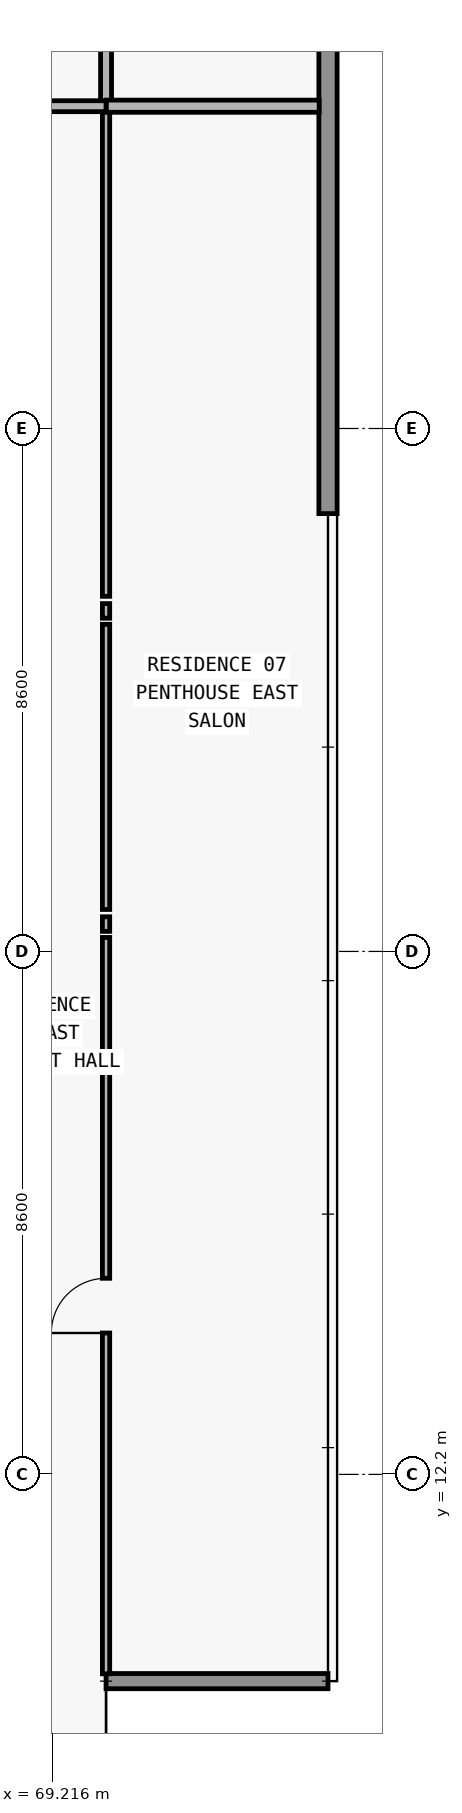
"""IFC4 building model, lengths in metres.
Left out: names, types, materials, properties, quantities, classifications, styles, units other than length and angle.
Written with IfcOpenShell. Run it as: python <this file> out.ifc"""

import sys

from ifc_helpers import new_model, si_unit, direction, frame, frame_2d, origin, place, context, subcontext, project, spatial, rectangle, extrude, element, fill, save


model = new_model("IFC4")
c1 = context("Model", 3, precision=1e-05, world=origin(), true_north=direction((0.0, 1.0)))
c2 = subcontext(c1, "Body", "Model", "MODEL_VIEW")
j1 = project(units=[si_unit("LENGTHUNIT", "METRE"), si_unit("PLANEANGLEUNIT", "RADIAN")], contexts=[c1])
p1 = place(None, origin())
s1 = spatial("IfcSite", under=j1, at=p1, CompositionType="ELEMENT")
p2 = place(p1, origin())
s2 = spatial("IfcBuilding", under=s1, at=p2, CompositionType="ELEMENT")
p3 = place(p2, frame((0.0, 0.0, 122.4)))
s3 = spatial("IfcBuildingStorey", under=s2, at=p3, CompositionType="ELEMENT", Elevation=122.4)
p4 = place(p3, frame((70.1, 8.8, 0.0), z_axis=(0.0, 0.0, 1.0), x_axis=(1.0, 0.0, 0.0)))
e1 = element("IfcWall", 1, at=p4, inside=s3, PredefinedType="ELEMENTEDWALL", context=c2, shape_type="SweptSolid", body=[
    extrude(rectangle(XDim=3.65, YDim=0.25, at=frame_2d((1.825, 0.0))), origin(), (0.0, 0.0, 1.0), 3.05),
])
p5 = place(p3, frame((73.75, 47.2, 0.0), z_axis=(0.0, 0.0, 1.0), x_axis=(0.0, -1.0, 0.0)))
e2 = element("IfcWall", 2, at=p5, inside=s3, PredefinedType="STANDARD", context=c2, shape_type="SweptSolid", body=[
    extrude(rectangle(XDim=19.2, YDim=0.3, at=frame_2d((9.6, 0.0))), origin(), (0.0, 0.0, 1.0), 3.05),
])
p6 = place(p3, frame((70.1, 8.92, 0.0), z_axis=(0.0, 0.0, 1.0), x_axis=(0.0, 1.0, 0.0)))
e3 = element("IfcWall", 3, at=p6, inside=s3, PredefinedType="PARTITIONING", context=c2, shape_type="SweptSolid", body=[
    extrude(rectangle(XDim=12.11, YDim=0.12, at=frame_2d((6.055, 0.0))), origin(), (0.0, 0.0, 1.0), 3.05),
])
p7 = place(p6, frame((5.605, 0.0, 0.0)))
e4 = element("IfcOpeningElement", 4, at=p7, cuts=e3, PredefinedType="OPENING", context=c2, shape_type="SweptSolid", body=[
    extrude(rectangle(XDim=0.9, YDim=2.15, at=frame_2d((0.45, 1.075))), frame((0.0, 0.07, 0.0), z_axis=(0.0, -1.0, 0.0), x_axis=(1.0, 0.0, 0.0)), (0.0, 0.0, 1.0), 0.14),
])
p8 = place(p3, frame((70.1, 21.13, 0.0), z_axis=(0.0, 0.0, 1.0), x_axis=(0.0, 1.0, 0.0)))
e5 = element("IfcWall", 5, at=p8, inside=s3, PredefinedType="PARTITIONING", context=c2, shape_type="SweptSolid", body=[
    extrude(rectangle(XDim=0.24, YDim=0.12, at=frame_2d((0.12, 0.0))), origin(), (0.0, 0.0, 1.0), 3.05),
])
p9 = place(p3, frame((70.1, 21.49, 0.0), z_axis=(0.0, 0.0, 1.0), x_axis=(0.0, 1.0, 0.0)))
e6 = element("IfcWall", 6, at=p9, inside=s3, PredefinedType="PARTITIONING", context=c2, shape_type="SweptSolid", body=[
    extrude(rectangle(XDim=4.69, YDim=0.12, at=frame_2d((2.345, 0.0))), origin(), (0.0, 0.0, 1.0), 3.05),
])
p10 = place(p3, frame((70.1, 26.28, 0.0), z_axis=(0.0, 0.0, 1.0), x_axis=(0.0, 1.0, 0.0)))
e7 = element("IfcWall", 7, at=p10, inside=s3, PredefinedType="PARTITIONING", context=c2, shape_type="SweptSolid", body=[
    extrude(rectangle(XDim=0.24, YDim=0.12, at=frame_2d((0.12, 0.0))), origin(), (0.0, 0.0, 1.0), 3.05),
])
p11 = place(p3, frame((70.1, 26.64, 0.0), z_axis=(0.0, 0.0, 1.0), x_axis=(0.0, 1.0, 0.0)))
e8 = element("IfcWall", 8, at=p11, inside=s3, PredefinedType="PARTITIONING", context=c2, shape_type="SweptSolid", body=[
    extrude(rectangle(XDim=8.06, YDim=0.12, at=frame_2d((4.03, 0.0))), origin(), (0.0, 0.0, 1.0), 3.05),
])
p12 = place(p3, frame((70.1, 34.705, 0.0), z_axis=(0.0, 0.0, 1.0), x_axis=(0.0, 1.0, 0.0)))
e9 = element("IfcWall", 9, at=p12, inside=s3, PredefinedType="PARTITIONING", context=c2, shape_type="SweptSolid", body=[
    extrude(rectangle(XDim=2.245, YDim=0.18, at=frame_2d((1.123, 0.0))), origin(), (0.0, 0.0, 1.0), 3.05),
])
p13 = place(p3, frame((59.55, 34.7, 0.0), z_axis=(0.0, 0.0, 1.0), x_axis=(1.0, 0.0, 0.0)))
e10 = element("IfcWall", 10, at=p13, inside=s3, PredefinedType="PARTITIONING", context=c2, shape_type="SweptSolid", body=[
    extrude(rectangle(XDim=10.55, YDim=0.18, at=frame_2d((5.275, 0.0))), origin(), (0.0, 0.0, 1.0), 3.05),
])
p14 = place(p13, frame((2.85, 0.0, 0.0)))
e11 = element("IfcOpeningElement", 11, at=p14, cuts=e10, PredefinedType="OPENING", context=c2, shape_type="SweptSolid", body=[
    extrude(rectangle(XDim=1.0, YDim=2.2, at=frame_2d((0.5, 1.1))), frame((0.0, 0.1, 0.0), z_axis=(0.0, -1.0, 0.0), x_axis=(1.0, 0.0, 0.0)), (0.0, 0.0, 1.0), 0.2),
])
p15 = place(p3, frame((70.105, 34.7, 0.0), z_axis=(0.0, 0.0, 1.0), x_axis=(1.0, 0.0, 0.0)))
e12 = element("IfcWall", 12, at=p15, inside=s3, PredefinedType="PARTITIONING", context=c2, shape_type="SweptSolid", body=[
    extrude(rectangle(XDim=3.5, YDim=0.2, at=frame_2d((1.75, 0.0))), origin(), (0.0, 0.0, 1.0), 3.05),
])
p16 = place(p7, origin())
e13 = element("IfcDoor", 13, at=p16, inside=s3, OperationType="SINGLE_SWING_LEFT", PredefinedType="DOOR", context=c2, shape_type="SweptSolid", body=[
    extrude(rectangle(XDim=0.9, YDim=2.15, at=frame_2d((0.45, 1.075))), frame((0.0, 0.025, 0.0), z_axis=(0.0, -1.0, 0.0), x_axis=(1.0, 0.0, 0.0)), (0.0, 0.0, 1.0), 0.05),
])
fill(e4, e13)
save(model, sys.argv[1])
